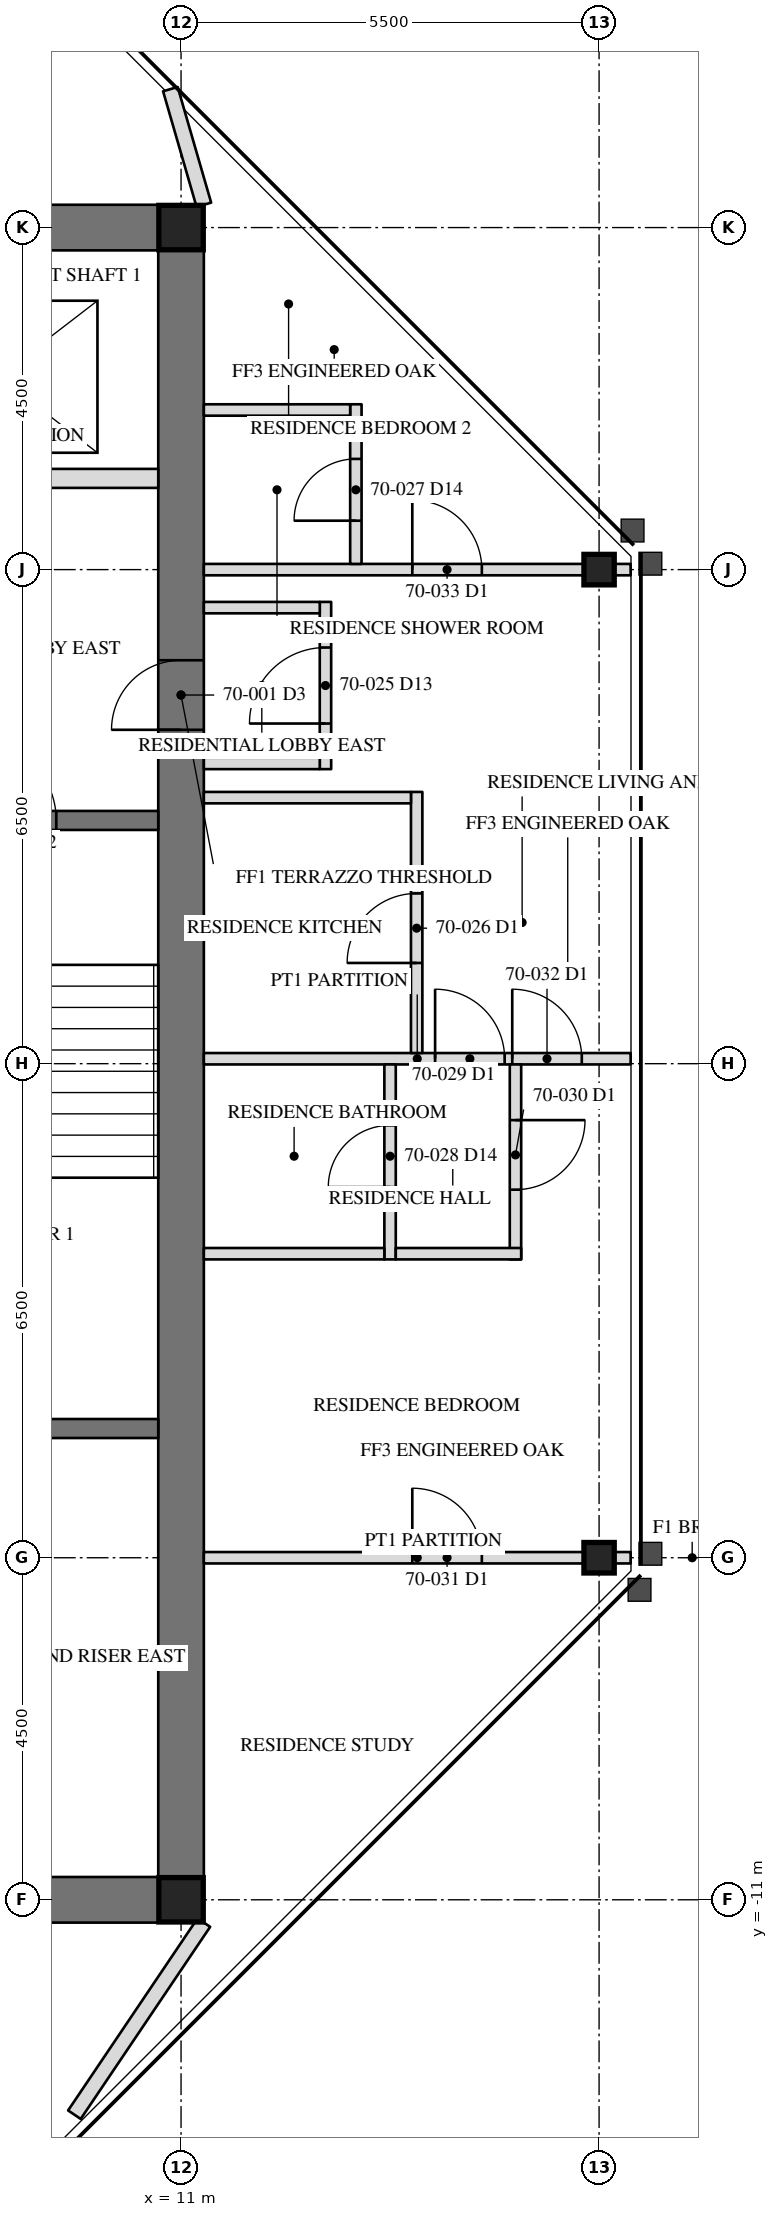
"""IFC4 building model, lengths in metres.
Left out: names, types, materials, properties, quantities, classifications, styles, units other than length and angle.
Written with IfcOpenShell. Run it as: python <this file> out.ifc"""

import sys

from ifc_helpers import new_model, si_unit, direction, frame, frame_2d, origin, origin_2d, place, context, subcontext, project, spatial, rectangle, hollow_rectangle, i_section, extrude, element, fill, save


model = new_model("IFC4")
c1 = context("Model", 3, precision=1e-05, world=origin(), true_north=direction((0.0, 1.0)))
c2 = subcontext(c1, "Body", "Model", "MODEL_VIEW")
j1 = project(units=[si_unit("LENGTHUNIT", "METRE"), si_unit("PLANEANGLEUNIT", "RADIAN")], contexts=[c1])
p1 = place(None, origin())
s1 = spatial("IfcSite", under=j1, at=p1, CompositionType="ELEMENT")
p2 = place(p1, origin())
s2 = spatial("IfcBuilding", under=s1, at=p2, CompositionType="ELEMENT")
p3 = place(p2, frame((0.0, 0.0, 284.8)))
s3 = spatial("IfcBuildingStorey", under=s2, at=p3, CompositionType="ELEMENT", Elevation=284.8)
for number, where, z_axis, x_axis in (
    (1, (16.5, -6.5, 0.0), (0.0, 0.0, 1.0), (0.0, 1.0, 0.0)),
    (2, (16.5, 6.5, 0.0), (0.0, 0.0, 1.0), (0.0, 1.0, 0.0)),
):
    element("IfcColumn", number, at=place(p3, frame(where, z_axis=z_axis, x_axis=x_axis)), inside=s3, PredefinedType="COLUMN", context=c2, shape_type="SweptSolid", body=[
        extrude(i_section(OverallWidth=0.401, OverallDepth=0.399, WebThickness=0.025, FlangeThickness=0.04, at=origin_2d()), origin(), (0.0, 0.0, 1.0), 3.6),
    ])
p4 = place(p3, frame((11.0, -11.0, 0.0), z_axis=(0.0, 0.0, 1.0), x_axis=(0.0, 1.0, 0.0)))
e3 = element("IfcWall", 3, at=p4, inside=s3, PredefinedType="SHEAR", context=c2, shape_type="SweptSolid", body=[
    extrude(rectangle(XDim=22.0, YDim=0.6, at=frame_2d((11.0, 0.0))), origin(), (0.0, 0.0, 1.0), 3.6),
])
p5 = place(p4, frame((15.393, 0.0, 0.0)))
e4 = element("IfcOpeningElement", 4, at=p5, cuts=e3, PredefinedType="OPENING", context=c2, shape_type="SweptSolid", body=[
    extrude(rectangle(XDim=0.915, YDim=2.134, at=frame_2d((0.458, 1.067))), frame((0.0, 0.31, 0.0), z_axis=(0.0, -1.0, 0.0), x_axis=(1.0, 0.0, 0.0)), (0.0, 0.0, 1.0), 0.62),
])
for number, where, z_axis, x_axis in (
    (5, (11.0, 11.0, 0.0), (0.0, 0.0, 1.0), (-1.0, 0.0, 0.0)),
    (6, (6.5, -11.0, 0.0), (0.0, 0.0, 1.0), (1.0, 0.0, 0.0)),
):
    element("IfcWall", number, at=place(p3, frame(where, z_axis=z_axis, x_axis=x_axis)), inside=s3, PredefinedType="SHEAR", context=c2, shape_type="SweptSolid", body=[
        extrude(rectangle(XDim=4.5, YDim=0.6, at=frame_2d((2.25, 0.0))), origin(), (0.0, 0.0, 1.0), 3.6),
    ])
for number, where, z_axis, x_axis in (
    (7, (11.0, 11.0, 0.0), (0.0, 0.0, 1.0), (1.0, 0.0, 0.0)),
    (8, (11.0, -11.0, 0.0), (0.0, 0.0, 1.0), (1.0, 0.0, 0.0)),
):
    element("IfcColumn", number, at=place(p3, frame(where, z_axis=z_axis, x_axis=x_axis)), inside=s3, PredefinedType="COLUMN", context=c2, shape_type="SweptSolid", body=[
        extrude(hollow_rectangle(XDim=0.584, YDim=0.584, WallThickness=0.051, at=origin_2d()), origin(), (0.0, 0.0, 1.0), 3.6),
    ])
p6 = place(p3, frame((6.95, -4.8, 0.0), z_axis=(0.0, 0.0, 1.0), x_axis=(1.0, 0.0, 0.0)))
e9 = element("IfcWall", 9, at=p6, inside=s3, PredefinedType="SOLIDWALL", context=c2, shape_type="SweptSolid", body=[
    extrude(rectangle(XDim=3.75, YDim=0.25, at=frame_2d((1.875, 0.0))), origin(), (0.0, 0.0, 1.0), 3.41),
])
p7 = place(p3, frame((6.95, 3.2, 0.0), z_axis=(0.0, 0.0, 1.0), x_axis=(1.0, 0.0, 0.0)))
e10 = element("IfcWall", 10, at=p7, inside=s3, PredefinedType="SOLIDWALL", context=c2, shape_type="SweptSolid", body=[
    extrude(rectangle(XDim=3.75, YDim=0.25, at=frame_2d((1.875, 0.0))), origin(), (0.0, 0.0, 1.0), 3.41),
])
p8 = place(p7, frame((1.342, 0.0, 0.0)))
e11 = element("IfcOpeningElement", 11, at=p8, cuts=e10, PredefinedType="OPENING", context=c2, shape_type="SweptSolid", body=[
    extrude(rectangle(XDim=1.067, YDim=2.134, at=frame_2d((0.533, 1.067))), frame((0.0, 0.135, 0.0), z_axis=(0.0, -1.0, 0.0), x_axis=(1.0, 0.0, 0.0)), (0.0, 0.0, 1.0), 0.27),
])
p9 = place(p3, frame((6.95, 7.7, 0.0), z_axis=(0.0, 0.0, 1.0), x_axis=(1.0, 0.0, 0.0)))
e12 = element("IfcWall", 12, at=p9, inside=s3, PredefinedType="PARTITIONING", context=c2, shape_type="SweptSolid", body=[
    extrude(rectangle(XDim=3.75, YDim=0.25, at=frame_2d((1.875, 0.0))), origin(), (0.0, 0.0, 1.0), 3.41),
])
p10 = place(p9, frame((0.45, 0.0, 0.0)))
e13 = element("IfcOpeningElement", 13, at=p10, cuts=e12, PredefinedType="OPENING", context=c2, shape_type="SweptSolid", body=[
    extrude(rectangle(XDim=1.219, YDim=2.134, at=frame_2d((0.609, 1.067))), frame((0.0, 0.135, 0.0), z_axis=(0.0, -1.0, 0.0), x_axis=(1.0, 0.0, 0.0)), (0.0, 0.0, 1.0), 0.27),
])
p11 = place(p3, frame((11.3, 11.3, 0.0), z_axis=(0.0, 0.0, 1.0), x_axis=(-0.278099250491, 0.960552344683, 0.0)))
e14 = element("IfcWall", 14, at=p11, inside=s3, PredefinedType="PARTITIONING", context=c2, shape_type="SweptSolid", body=[
    extrude(rectangle(XDim=1.584, YDim=0.2, at=frame_2d((0.792, 0.0))), origin(), (0.0, 0.0, 1.0), 3.41),
])
p12 = place(p3, frame((11.3, -11.3, 0.0), z_axis=(0.0, 0.0, 1.0), x_axis=(-0.558834300538, -0.829279340477, 0.0)))
e15 = element("IfcWall", 15, at=p12, inside=s3, PredefinedType="PARTITIONING", context=c2, shape_type="SweptSolid", body=[
    extrude(rectangle(XDim=3.048, YDim=0.2, at=frame_2d((1.524, 0.0))), origin(), (0.0, 0.0, 1.0), 2.704),
])
p13 = place(p3, frame((11.3, -6.5, 0.0), z_axis=(0.0, 0.0, 1.0), x_axis=(1.0, 0.0, 0.0)))
e16 = element("IfcWall", 16, at=p13, inside=s3, PredefinedType="PARTITIONING", context=c2, shape_type="SweptSolid", body=[
    extrude(rectangle(XDim=5.615, YDim=0.15, at=frame_2d((2.808, 0.0))), origin(), (0.0, 0.0, 1.0), 2.966),
])
p14 = place(p13, frame((2.742, 0.0, 0.0)))
e17 = element("IfcOpeningElement", 17, at=p14, cuts=e16, PredefinedType="OPENING", context=c2, shape_type="SweptSolid", body=[
    extrude(rectangle(XDim=0.915, YDim=2.134, at=frame_2d((0.458, 1.067))), frame((0.0, 0.085, 0.0), z_axis=(0.0, -1.0, 0.0), x_axis=(1.0, 0.0, 0.0)), (0.0, 0.0, 1.0), 0.17),
])
p15 = place(p3, frame((11.3, 0.065, 0.0), z_axis=(0.0, 0.0, 1.0), x_axis=(1.0, 0.0, 0.0)))
e18 = element("IfcWall", 18, at=p15, inside=s3, PredefinedType="PARTITIONING", context=c2, shape_type="SweptSolid", body=[
    extrude(rectangle(XDim=5.615, YDim=0.15, at=frame_2d((2.808, 0.0))), origin(), (0.0, 0.0, 1.0), 2.709),
])
p16 = place(p15, frame((3.042, 0.0, 0.0)))
e19 = element("IfcOpeningElement", 19, at=p16, cuts=e18, PredefinedType="OPENING", context=c2, shape_type="SweptSolid", body=[
    extrude(rectangle(XDim=0.915, YDim=2.134, at=frame_2d((0.458, 1.067))), frame((0.0, 0.085, 0.0), z_axis=(0.0, -1.0, 0.0), x_axis=(1.0, 0.0, 0.0)), (0.0, 0.0, 1.0), 0.17),
])
p17 = place(p15, frame((4.058, 0.0, 0.0)))
e20 = element("IfcOpeningElement", 20, at=p17, cuts=e18, PredefinedType="OPENING", context=c2, shape_type="SweptSolid", body=[
    extrude(rectangle(XDim=0.915, YDim=2.134, at=frame_2d((0.458, 1.067))), frame((0.0, 0.085, 0.0), z_axis=(0.0, -1.0, 0.0), x_axis=(1.0, 0.0, 0.0)), (0.0, 0.0, 1.0), 0.17),
])
p18 = place(p3, frame((11.3, 6.5, 0.0), z_axis=(0.0, 0.0, 1.0), x_axis=(1.0, 0.0, 0.0)))
e21 = element("IfcWall", 21, at=p18, inside=s3, PredefinedType="PARTITIONING", context=c2, shape_type="SweptSolid", body=[
    extrude(rectangle(XDim=5.615, YDim=0.15, at=frame_2d((2.808, 0.0))), origin(), (0.0, 0.0, 1.0), 2.966),
])
p19 = place(p18, frame((2.742, 0.0, 0.0)))
e22 = element("IfcOpeningElement", 22, at=p19, cuts=e21, PredefinedType="OPENING", context=c2, shape_type="SweptSolid", body=[
    extrude(rectangle(XDim=0.915, YDim=2.134, at=frame_2d((0.458, 1.067))), frame((0.0, 0.085, 0.0), z_axis=(0.0, -1.0, 0.0), x_axis=(1.0, 0.0, 0.0)), (0.0, 0.0, 1.0), 0.17),
])
p20 = place(p3, frame((12.9, 3.875, 0.0), z_axis=(0.0, 0.0, 1.0), x_axis=(0.0, 1.0, 0.0)))
e23 = element("IfcWall", 23, at=p20, inside=s3, PredefinedType="PARTITIONING", context=c2, shape_type="SweptSolid", body=[
    extrude(rectangle(XDim=2.2, YDim=0.15, at=frame_2d((1.1, 0.0))), origin(), (0.0, 0.0, 1.0), 3.41),
])
p21 = place(p20, frame((0.6, 0.0, 0.0)))
e24 = element("IfcOpeningElement", 24, at=p21, cuts=e23, PredefinedType="OPENING", context=c2, shape_type="SweptSolid", body=[
    extrude(rectangle(XDim=1.0, YDim=2.134, at=frame_2d((0.5, 1.067))), frame((0.0, 0.085, 0.0), z_axis=(0.0, -1.0, 0.0), x_axis=(1.0, 0.0, 0.0)), (0.0, 0.0, 1.0), 0.17),
])
for number, where, z_axis, x_axis in (
    (25, (11.3, 3.95, 0.0), (0.0, 0.0, 1.0), (1.0, 0.0, 0.0)),
    (26, (11.3, 6.0, 0.0), (0.0, 0.0, 1.0), (1.0, 0.0, 0.0)),
):
    element("IfcWall", number, at=place(p3, frame(where, z_axis=z_axis, x_axis=x_axis)), inside=s3, PredefinedType="PARTITIONING", context=c2, shape_type="SweptSolid", body=[
        extrude(rectangle(XDim=1.525, YDim=0.15, at=frame_2d((0.762, 0.0))), origin(), (0.0, 0.0, 1.0), 3.41),
    ])
p22 = place(p3, frame((14.1, 0.14, 0.0), z_axis=(0.0, 0.0, 1.0), x_axis=(0.0, 1.0, 0.0)))
e27 = element("IfcWall", 27, at=p22, inside=s3, PredefinedType="PARTITIONING", context=c2, shape_type="SweptSolid", body=[
    extrude(rectangle(XDim=3.435, YDim=0.15, at=frame_2d((1.718, 0.0))), origin(), (0.0, 0.0, 1.0), 3.41),
])
p23 = place(p22, frame((1.185, 0.0, 0.0)))
e28 = element("IfcOpeningElement", 28, at=p23, cuts=e27, PredefinedType="OPENING", context=c2, shape_type="SweptSolid", body=[
    extrude(rectangle(XDim=0.915, YDim=2.134, at=frame_2d((0.458, 1.067))), frame((0.0, 0.085, 0.0), z_axis=(0.0, -1.0, 0.0), x_axis=(1.0, 0.0, 0.0)), (0.0, 0.0, 1.0), 0.17),
])
p24 = place(p3, frame((11.3, 3.5, 0.0), z_axis=(0.0, 0.0, 1.0), x_axis=(1.0, 0.0, 0.0)))
e29 = element("IfcWall", 29, at=p24, inside=s3, PredefinedType="PARTITIONING", context=c2, shape_type="SweptSolid", body=[
    extrude(rectangle(XDim=2.725, YDim=0.15, at=frame_2d((1.362, 0.0))), origin(), (0.0, 0.0, 1.0), 3.41),
])
p25 = place(p3, frame((13.3, 6.575, 0.0), z_axis=(0.0, 0.0, 1.0), x_axis=(0.0, 1.0, 0.0)))
e30 = element("IfcWall", 30, at=p25, inside=s3, PredefinedType="PARTITIONING", context=c2, shape_type="SweptSolid", body=[
    extrude(rectangle(XDim=2.1, YDim=0.15, at=frame_2d((1.05, 0.0))), origin(), (0.0, 0.0, 1.0), 3.41),
])
p26 = place(p25, frame((0.569, 0.0, 0.0)))
e31 = element("IfcOpeningElement", 31, at=p26, cuts=e30, PredefinedType="OPENING", context=c2, shape_type="SweptSolid", body=[
    extrude(rectangle(XDim=0.813, YDim=2.032, at=frame_2d((0.406, 1.016))), frame((0.0, 0.085, 0.0), z_axis=(0.0, -1.0, 0.0), x_axis=(1.0, 0.0, 0.0)), (0.0, 0.0, 1.0), 0.17),
])
p27 = place(p3, frame((11.3, 8.6, 0.0), z_axis=(0.0, 0.0, 1.0), x_axis=(1.0, 0.0, 0.0)))
e32 = element("IfcWall", 32, at=p27, inside=s3, PredefinedType="PARTITIONING", context=c2, shape_type="SweptSolid", body=[
    extrude(rectangle(XDim=1.925, YDim=0.15, at=frame_2d((0.962, 0.0))), origin(), (0.0, 0.0, 1.0), 3.41),
])
p28 = place(p3, frame((13.75, -2.575, 0.0), z_axis=(0.0, 0.0, 1.0), x_axis=(0.0, 1.0, 0.0)))
e33 = element("IfcWall", 33, at=p28, inside=s3, PredefinedType="PARTITIONING", context=c2, shape_type="SweptSolid", body=[
    extrude(rectangle(XDim=2.565, YDim=0.15, at=frame_2d((1.282, 0.0))), origin(), (0.0, 0.0, 1.0), 3.41),
])
p29 = place(p28, frame((0.951, 0.0, 0.0)))
e34 = element("IfcOpeningElement", 34, at=p29, cuts=e33, PredefinedType="OPENING", context=c2, shape_type="SweptSolid", body=[
    extrude(rectangle(XDim=0.813, YDim=2.032, at=frame_2d((0.406, 1.016))), frame((0.0, 0.085, 0.0), z_axis=(0.0, -1.0, 0.0), x_axis=(1.0, 0.0, 0.0)), (0.0, 0.0, 1.0), 0.17),
])
p30 = place(p3, frame((11.3, -2.5, 0.0), z_axis=(0.0, 0.0, 1.0), x_axis=(1.0, 0.0, 0.0)))
e35 = element("IfcWall", 35, at=p30, inside=s3, PredefinedType="PARTITIONING", context=c2, shape_type="SweptSolid", body=[
    extrude(rectangle(XDim=2.375, YDim=0.15, at=frame_2d((1.188, 0.0))), origin(), (0.0, 0.0, 1.0), 3.41),
])
p31 = place(p3, frame((15.4, -0.01, 0.0), z_axis=(0.0, 0.0, 1.0), x_axis=(0.0, -1.0, 0.0)))
e36 = element("IfcWall", 36, at=p31, inside=s3, PredefinedType="PARTITIONING", context=c2, shape_type="SweptSolid", body=[
    extrude(rectangle(XDim=2.565, YDim=0.15, at=frame_2d((1.282, 0.0))), origin(), (0.0, 0.0, 1.0), 3.41),
])
p32 = place(p31, frame((0.732, 0.0, 0.0)))
e37 = element("IfcOpeningElement", 37, at=p32, cuts=e36, PredefinedType="OPENING", context=c2, shape_type="SweptSolid", body=[
    extrude(rectangle(XDim=0.915, YDim=2.134, at=frame_2d((0.458, 1.067))), frame((0.0, 0.085, 0.0), z_axis=(0.0, -1.0, 0.0), x_axis=(1.0, 0.0, 0.0)), (0.0, 0.0, 1.0), 0.17),
])
p33 = place(p3, frame((13.825, -2.5, 0.0), z_axis=(0.0, 0.0, 1.0), x_axis=(1.0, 0.0, 0.0)))
e38 = element("IfcWall", 38, at=p33, inside=s3, PredefinedType="PARTITIONING", context=c2, shape_type="SweptSolid", body=[
    extrude(rectangle(XDim=1.65, YDim=0.15, at=frame_2d((0.825, 0.0))), origin(), (0.0, 0.0, 1.0), 3.41),
])
p34 = place(p5, origin())
e39 = element("IfcDoor", 39, at=p34, inside=s3, OperationType="SINGLE_SWING_RIGHT", PredefinedType="DOOR", context=c2, shape_type="SweptSolid", body=[
    extrude(rectangle(XDim=0.915, YDim=2.134, at=frame_2d((0.458, 1.067))), frame((0.0, -0.225, 0.0), z_axis=(0.0, -1.0, 0.0), x_axis=(1.0, 0.0, 0.0)), (0.0, 0.0, 1.0), 0.05),
])
fill(e4, e39)
p35 = place(p8, origin())
e40 = element("IfcDoor", 40, at=p35, inside=s3, OperationType="SINGLE_SWING_LEFT", PredefinedType="DOOR", context=c2, shape_type="SweptSolid", body=[
    extrude(rectangle(XDim=1.067, YDim=2.134, at=frame_2d((0.533, 1.067))), frame((0.0, 0.025, 0.0), z_axis=(0.0, -1.0, 0.0), x_axis=(1.0, 0.0, 0.0)), (0.0, 0.0, 1.0), 0.05),
])
fill(e11, e40)
p36 = place(p21, origin())
e41 = element("IfcDoor", 41, at=p36, inside=s3, OperationType="SINGLE_SWING_RIGHT", PredefinedType="DOOR", context=c2, shape_type="SweptSolid", body=[
    extrude(rectangle(XDim=1.0, YDim=2.134, at=frame_2d((0.5, 1.067))), frame((0.0, 0.025, 0.0), z_axis=(0.0, -1.0, 0.0), x_axis=(1.0, 0.0, 0.0)), (0.0, 0.0, 1.0), 0.05),
])
fill(e24, e41)
p37 = place(p23, origin())
e42 = element("IfcDoor", 42, at=p37, inside=s3, OperationType="SINGLE_SWING_LEFT", PredefinedType="DOOR", context=c2, shape_type="SweptSolid", body=[
    extrude(rectangle(XDim=0.915, YDim=2.134, at=frame_2d((0.458, 1.067))), frame((0.0, 0.025, 0.0), z_axis=(0.0, -1.0, 0.0), x_axis=(1.0, 0.0, 0.0)), (0.0, 0.0, 1.0), 0.05),
])
fill(e28, e42)
p38 = place(p26, origin())
e43 = element("IfcDoor", 43, at=p38, inside=s3, OperationType="SINGLE_SWING_LEFT", PredefinedType="DOOR", context=c2, shape_type="SweptSolid", body=[
    extrude(rectangle(XDim=0.813, YDim=2.032, at=frame_2d((0.406, 1.016))), frame((0.0, 0.025, 0.0), z_axis=(0.0, -1.0, 0.0), x_axis=(1.0, 0.0, 0.0)), (0.0, 0.0, 1.0), 0.05),
])
fill(e31, e43)
p39 = place(p29, origin())
e44 = element("IfcDoor", 44, at=p39, inside=s3, OperationType="SINGLE_SWING_LEFT", PredefinedType="DOOR", context=c2, shape_type="SweptSolid", body=[
    extrude(rectangle(XDim=0.813, YDim=2.032, at=frame_2d((0.406, 1.016))), frame((0.0, 0.025, 0.0), z_axis=(0.0, -1.0, 0.0), x_axis=(1.0, 0.0, 0.0)), (0.0, 0.0, 1.0), 0.05),
])
fill(e34, e44)
p40 = place(p16, origin())
e45 = element("IfcDoor", 45, at=p40, inside=s3, OperationType="SINGLE_SWING_LEFT", PredefinedType="DOOR", context=c2, shape_type="SweptSolid", body=[
    extrude(rectangle(XDim=0.915, YDim=2.134, at=frame_2d((0.458, 1.067))), frame((0.0, 0.025, 0.0), z_axis=(0.0, -1.0, 0.0), x_axis=(1.0, 0.0, 0.0)), (0.0, 0.0, 1.0), 0.05),
])
fill(e19, e45)
p41 = place(p32, origin())
e46 = element("IfcDoor", 46, at=p41, inside=s3, OperationType="SINGLE_SWING_LEFT", PredefinedType="DOOR", context=c2, shape_type="SweptSolid", body=[
    extrude(rectangle(XDim=0.915, YDim=2.134, at=frame_2d((0.458, 1.067))), frame((0.0, 0.025, 0.0), z_axis=(0.0, -1.0, 0.0), x_axis=(1.0, 0.0, 0.0)), (0.0, 0.0, 1.0), 0.05),
])
fill(e37, e46)
p42 = place(p14, origin())
e47 = element("IfcDoor", 47, at=p42, inside=s3, OperationType="SINGLE_SWING_LEFT", PredefinedType="DOOR", context=c2, shape_type="SweptSolid", body=[
    extrude(rectangle(XDim=0.915, YDim=2.134, at=frame_2d((0.458, 1.067))), frame((0.0, 0.025, 0.0), z_axis=(0.0, -1.0, 0.0), x_axis=(1.0, 0.0, 0.0)), (0.0, 0.0, 1.0), 0.05),
])
fill(e17, e47)
p43 = place(p17, origin())
e48 = element("IfcDoor", 48, at=p43, inside=s3, OperationType="SINGLE_SWING_LEFT", PredefinedType="DOOR", context=c2, shape_type="SweptSolid", body=[
    extrude(rectangle(XDim=0.915, YDim=2.134, at=frame_2d((0.458, 1.067))), frame((0.0, 0.025, 0.0), z_axis=(0.0, -1.0, 0.0), x_axis=(1.0, 0.0, 0.0)), (0.0, 0.0, 1.0), 0.05),
])
fill(e20, e48)
p44 = place(p19, origin())
e49 = element("IfcDoor", 49, at=p44, inside=s3, OperationType="SINGLE_SWING_LEFT", PredefinedType="DOOR", context=c2, shape_type="SweptSolid", body=[
    extrude(rectangle(XDim=0.915, YDim=2.134, at=frame_2d((0.458, 1.067))), frame((0.0, 0.025, 0.0), z_axis=(0.0, -1.0, 0.0), x_axis=(1.0, 0.0, 0.0)), (0.0, 0.0, 1.0), 0.05),
])
fill(e22, e49)
save(model, sys.argv[1])
